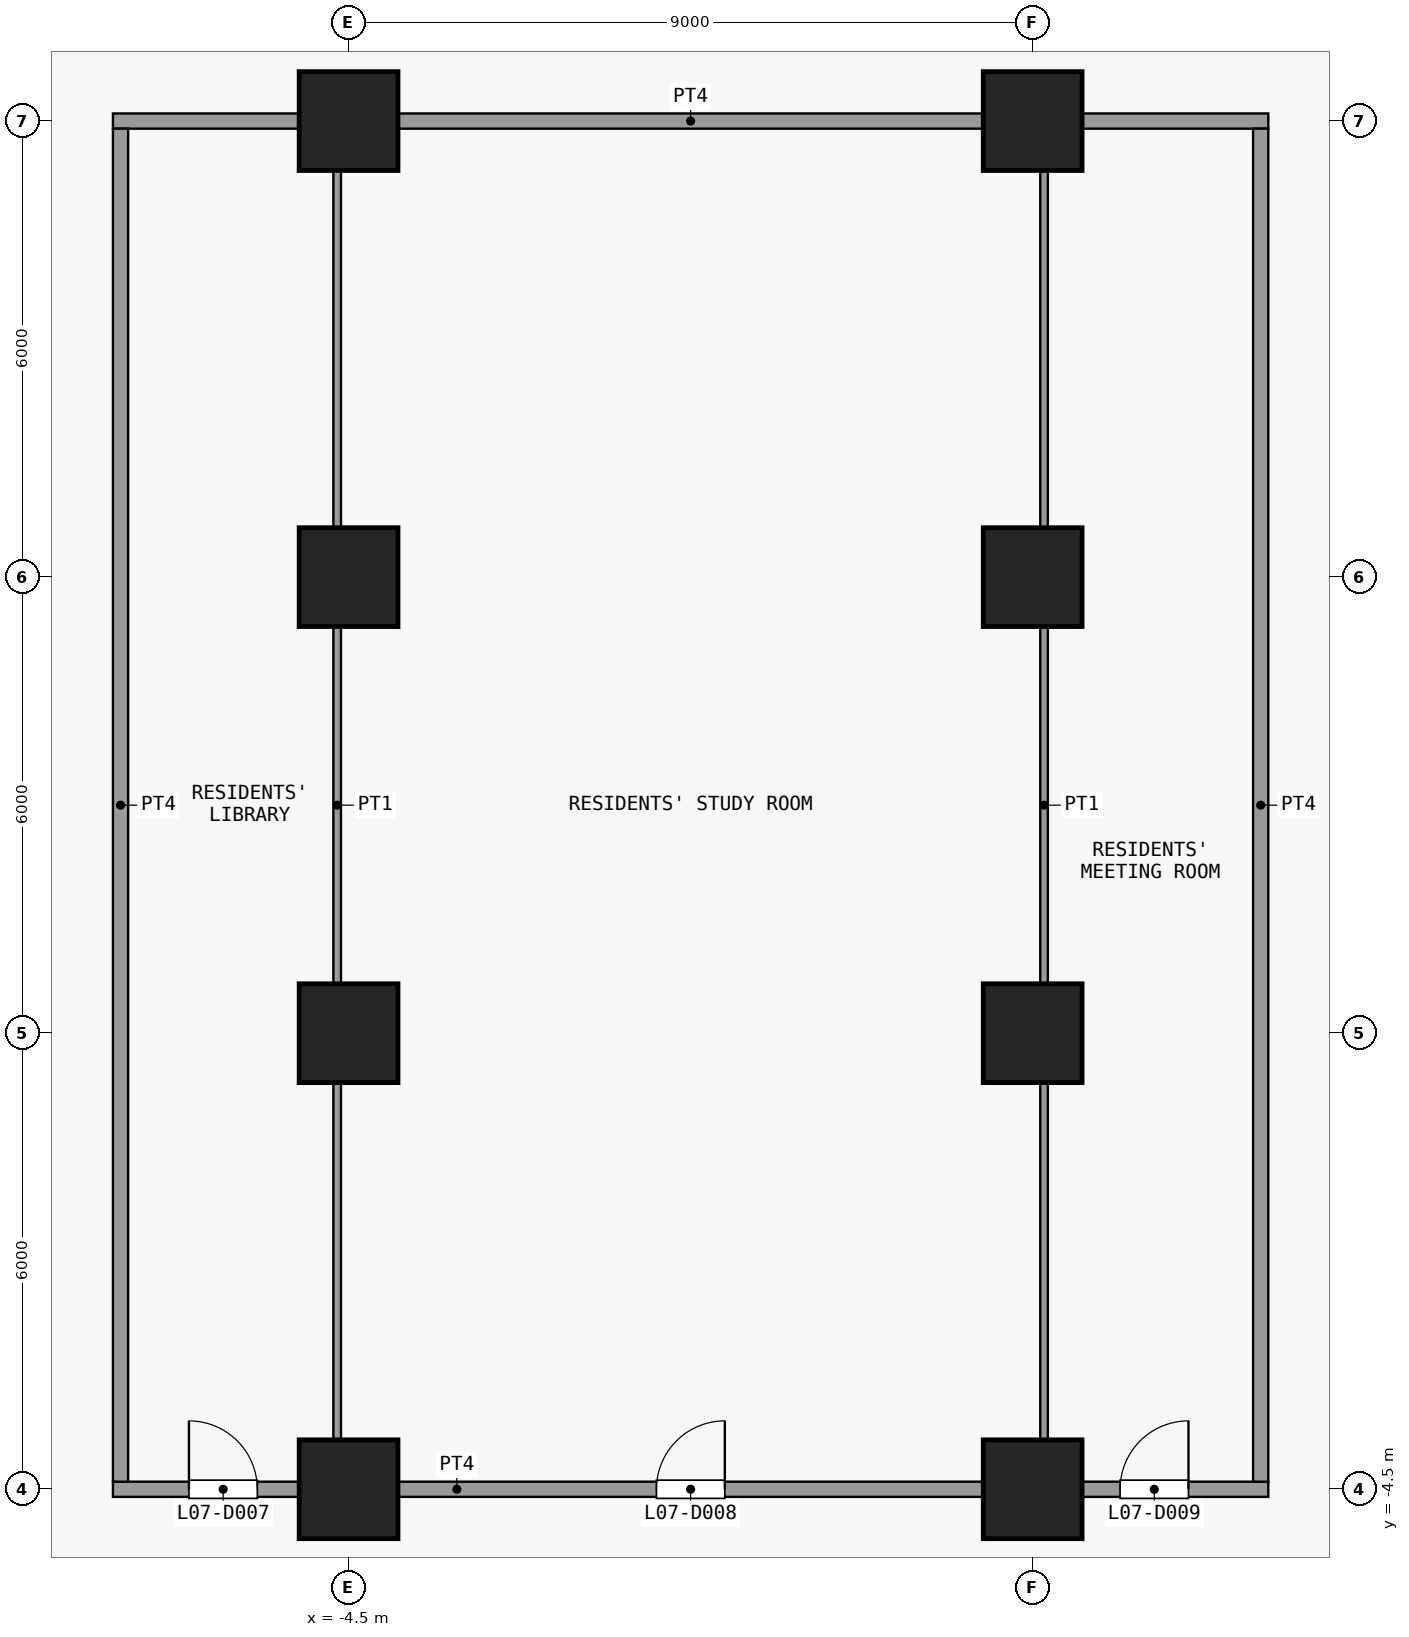
"""IFC4 building model, lengths in metres.
Left out: names, types, materials, properties, quantities, classifications, styles, units other than length and angle.
Written with IfcOpenShell. Run it as: python <this file> out.ifc"""

import sys

from ifc_helpers import new_model, si_unit, direction, frame, frame_2d, origin, origin_2d, place, context, subcontext, project, spatial, rectangle, extrude, element, fill, save


model = new_model("IFC4")
c1 = context("Model", 3, precision=1e-05, world=origin(), true_north=direction((0.0, 1.0)))
c2 = subcontext(c1, "Body", "Model", "MODEL_VIEW")
j1 = project(units=[si_unit("LENGTHUNIT", "METRE"), si_unit("PLANEANGLEUNIT", "RADIAN")], contexts=[c1])
p1 = place(None, origin())
s1 = spatial("IfcSite", under=j1, at=p1, CompositionType="ELEMENT")
p2 = place(p1, origin())
s2 = spatial("IfcBuilding", under=s1, at=p2, CompositionType="ELEMENT")
p3 = place(p2, frame((0.0, 0.0, 36.1)))
s3 = spatial("IfcBuildingStorey", under=s2, at=p3, CompositionType="ELEMENT", Elevation=36.1)
for number, where, z_axis, x_axis in (
    (1, (-4.5, -4.5, 0.0), (0.0, 0.0, 1.0), (1.0, 0.0, 0.0)),
    (2, (-4.5, 1.5, 0.0), (0.0, 0.0, 1.0), (1.0, 0.0, 0.0)),
    (3, (-4.5, 7.5, 0.0), (0.0, 0.0, 1.0), (1.0, 0.0, 0.0)),
    (4, (-4.5, 13.5, 0.0), (0.0, 0.0, 1.0), (1.0, 0.0, 0.0)),
    (5, (4.5, -4.5, 0.0), (0.0, 0.0, 1.0), (1.0, 0.0, 0.0)),
    (6, (4.5, 1.5, 0.0), (0.0, 0.0, 1.0), (1.0, 0.0, 0.0)),
    (7, (4.5, 7.5, 0.0), (0.0, 0.0, 1.0), (1.0, 0.0, 0.0)),
    (8, (4.5, 13.5, 0.0), (0.0, 0.0, 1.0), (1.0, 0.0, 0.0)),
):
    element("IfcColumn", number, at=place(p3, frame(where, z_axis=z_axis, x_axis=x_axis)), inside=s3, PredefinedType="COLUMN", context=c2, shape_type="SweptSolid", body=[
        extrude(rectangle(XDim=1.3, YDim=1.3, at=origin_2d()), origin(), (0.0, 0.0, 1.0), 3.6),
    ])
p4 = place(p3, frame((-7.6, -4.5, 0.0), z_axis=(0.0, 0.0, 1.0), x_axis=(1.0, 0.0, 0.0)))
e9 = element("IfcWall", 9, at=p4, inside=s3, PredefinedType="PARTITIONING", context=c2, shape_type="SweptSolid", body=[
    extrude(rectangle(XDim=15.2, YDim=0.2, at=frame_2d((7.6, 0.0))), origin(), (0.0, 0.0, 1.0), 3.3),
])
p5 = place(p4, frame((1.0, 0.0, 0.0)))
e10 = element("IfcOpeningElement", 10, at=p5, cuts=e9, PredefinedType="OPENING", context=c2, shape_type="SweptSolid", body=[
    extrude(rectangle(XDim=0.9, YDim=2.1, at=frame_2d((0.45, 1.05))), frame((0.0, 0.11, 0.0), z_axis=(0.0, -1.0, 0.0), x_axis=(1.0, 0.0, 0.0)), (0.0, 0.0, 1.0), 0.22),
])
p6 = place(p4, frame((7.15, 0.0, 0.0)))
e11 = element("IfcOpeningElement", 11, at=p6, cuts=e9, PredefinedType="OPENING", context=c2, shape_type="SweptSolid", body=[
    extrude(rectangle(XDim=0.9, YDim=2.1, at=frame_2d((0.45, 1.05))), frame((0.0, 0.11, 0.0), z_axis=(0.0, -1.0, 0.0), x_axis=(1.0, 0.0, 0.0)), (0.0, 0.0, 1.0), 0.22),
])
p7 = place(p4, frame((13.25, 0.0, 0.0)))
e12 = element("IfcOpeningElement", 12, at=p7, cuts=e9, PredefinedType="OPENING", context=c2, shape_type="SweptSolid", body=[
    extrude(rectangle(XDim=0.9, YDim=2.1, at=frame_2d((0.45, 1.05))), frame((0.0, 0.11, 0.0), z_axis=(0.0, -1.0, 0.0), x_axis=(1.0, 0.0, 0.0)), (0.0, 0.0, 1.0), 0.22),
])
p8 = place(p3, frame((-7.6, 13.5, 0.0), z_axis=(0.0, 0.0, 1.0), x_axis=(1.0, 0.0, 0.0)))
e13 = element("IfcWall", 13, at=p8, inside=s3, PredefinedType="PARTITIONING", context=c2, shape_type="SweptSolid", body=[
    extrude(rectangle(XDim=15.2, YDim=0.2, at=frame_2d((7.6, 0.0))), origin(), (0.0, 0.0, 1.0), 3.3),
])
p9 = place(p3, frame((-7.5, -4.4, 0.0), z_axis=(0.0, 0.0, 1.0), x_axis=(0.0, 1.0, 0.0)))
e14 = element("IfcWall", 14, at=p9, inside=s3, PredefinedType="PARTITIONING", context=c2, shape_type="SweptSolid", body=[
    extrude(rectangle(XDim=17.8, YDim=0.2, at=frame_2d((8.9, 0.0))), origin(), (0.0, 0.0, 1.0), 3.3),
])
for number, where, z_axis, x_axis in (
    (15, (-4.65, -4.4, 0.0), (0.0, 0.0, 1.0), (0.0, 1.0, 0.0)),
    (16, (4.65, -4.4, 0.0), (0.0, 0.0, 1.0), (0.0, 1.0, 0.0)),
):
    element("IfcWall", number, at=place(p3, frame(where, z_axis=z_axis, x_axis=x_axis)), inside=s3, PredefinedType="PARTITIONING", context=c2, shape_type="SweptSolid", body=[
        extrude(rectangle(XDim=17.8, YDim=0.1, at=frame_2d((8.9, 0.0))), origin(), (0.0, 0.0, 1.0), 3.3),
    ])
p10 = place(p3, frame((7.5, -4.4, 0.0), z_axis=(0.0, 0.0, 1.0), x_axis=(0.0, 1.0, 0.0)))
e17 = element("IfcWall", 17, at=p10, inside=s3, PredefinedType="PARTITIONING", context=c2, shape_type="SweptSolid", body=[
    extrude(rectangle(XDim=17.8, YDim=0.2, at=frame_2d((8.9, 0.0))), origin(), (0.0, 0.0, 1.0), 3.3),
])
p11 = place(p5, origin())
e18 = element("IfcDoor", 18, at=p11, inside=s3, OperationType="SINGLE_SWING_RIGHT", PredefinedType="DOOR", context=c2, shape_type="SweptSolid", body=[
    extrude(rectangle(XDim=0.9, YDim=2.1, at=frame_2d((0.45, 1.05))), frame((0.0, 0.025, 0.0), z_axis=(0.0, -1.0, 0.0), x_axis=(1.0, 0.0, 0.0)), (0.0, 0.0, 1.0), 0.05),
])
fill(e10, e18)
p12 = place(p6, origin())
e19 = element("IfcDoor", 19, at=p12, inside=s3, OperationType="SINGLE_SWING_LEFT", PredefinedType="DOOR", context=c2, shape_type="SweptSolid", body=[
    extrude(rectangle(XDim=0.9, YDim=2.1, at=frame_2d((0.45, 1.05))), frame((0.0, 0.025, 0.0), z_axis=(0.0, -1.0, 0.0), x_axis=(1.0, 0.0, 0.0)), (0.0, 0.0, 1.0), 0.05),
])
fill(e11, e19)
p13 = place(p7, origin())
e20 = element("IfcDoor", 20, at=p13, inside=s3, OperationType="SINGLE_SWING_LEFT", PredefinedType="DOOR", context=c2, shape_type="SweptSolid", body=[
    extrude(rectangle(XDim=0.9, YDim=2.1, at=frame_2d((0.45, 1.05))), frame((0.0, 0.025, 0.0), z_axis=(0.0, -1.0, 0.0), x_axis=(1.0, 0.0, 0.0)), (0.0, 0.0, 1.0), 0.05),
])
fill(e12, e20)
save(model, sys.argv[1])
